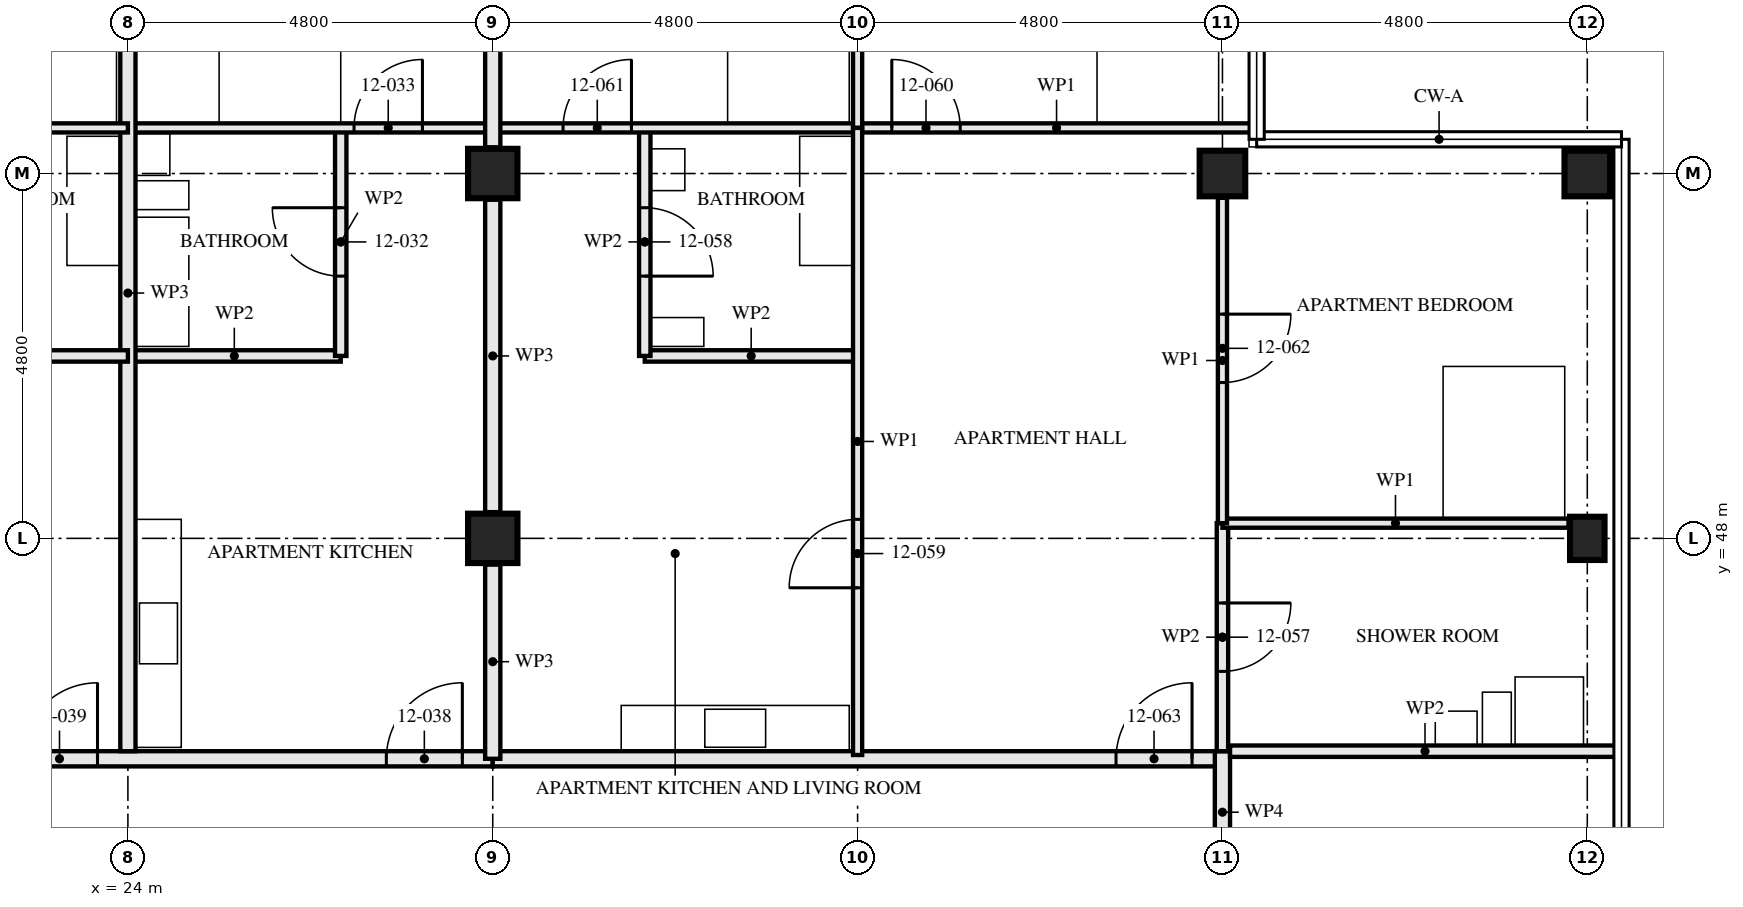
"""IFC4 building model, lengths in metres.
Left out: names, types, materials, properties, quantities, classifications, styles, units other than length and angle.
Written with IfcOpenShell. Run it as: python <this file> out.ifc"""

import sys

from ifc_helpers import new_model, si_unit, direction, frame, frame_2d, origin, origin_2d, place, context, subcontext, project, spatial, rectangle, hollow_rectangle, i_section, extrude, element, fill, save


model = new_model("IFC4")
c1 = context("Model", 3, precision=1e-05, world=origin(), true_north=direction((0.0, 1.0)))
c2 = subcontext(c1, "Body", "Model", "MODEL_VIEW")
j1 = project(units=[si_unit("LENGTHUNIT", "METRE"), si_unit("PLANEANGLEUNIT", "RADIAN")], contexts=[c1])
p1 = place(None, origin())
s1 = spatial("IfcSite", under=j1, at=p1, CompositionType="ELEMENT")
p2 = place(p1, origin())
s2 = spatial("IfcBuilding", under=s1, at=p2, CompositionType="ELEMENT")
p3 = place(p2, frame((0.0, 0.0, 48.0)))
s3 = spatial("IfcBuildingStorey", under=s2, at=p3, CompositionType="ELEMENT", Elevation=48.0)
for number, where, z_axis, x_axis in (
    (1, (28.8, 48.0, 0.0), (0.0, 0.0, 1.0), (1.0, 0.0, 0.0)),
    (2, (28.8, 52.8, 0.0), (0.0, 0.0, 1.0), (1.0, 0.0, 0.0)),
):
    element("IfcColumn", number, at=place(p3, frame(where, z_axis=z_axis, x_axis=x_axis)), inside=s3, PredefinedType="COLUMN", context=c2, shape_type="SweptSolid", body=[
        extrude(hollow_rectangle(XDim=0.65, YDim=0.65, WallThickness=0.05, at=origin_2d()), origin(), (0.0, 0.0, 1.0), 3.5),
    ])
p4 = place(p3, frame((38.4, 52.8, 0.0), z_axis=(0.0, 0.0, 1.0), x_axis=(0.0, 1.0, 0.0)))
e3 = element("IfcColumn", 3, at=p4, inside=s3, PredefinedType="COLUMN", context=c2, shape_type="SweptSolid", body=[
    extrude(hollow_rectangle(XDim=0.6, YDim=0.6, WallThickness=0.05, at=origin_2d()), origin(), (0.0, 0.0, 1.0), 3.5),
])
p5 = place(p3, frame((43.2, 48.0, 0.0), z_axis=(0.0, 0.0, 1.0), x_axis=(1.0, 0.0, 0.0)))
e4 = element("IfcColumn", 4, at=p5, inside=s3, PredefinedType="COLUMN", context=c2, shape_type="SweptSolid", body=[
    extrude(i_section(OverallWidth=0.454, OverallDepth=0.569, WebThickness=0.078, FlangeThickness=0.125, FilletRadius=0.015, at=origin_2d()), origin(), (0.0, 0.0, 1.0), 3.5),
])
p6 = place(p3, frame((43.2, 52.8, 0.0), z_axis=(0.0, 0.0, 1.0), x_axis=(0.0, 1.0, 0.0)))
e5 = element("IfcColumn", 5, at=p6, inside=s3, PredefinedType="COLUMN", context=c2, shape_type="SweptSolid", body=[
    extrude(hollow_rectangle(XDim=0.6, YDim=0.6, WallThickness=0.05, at=origin_2d()), origin(), (0.0, 0.0, 1.0), 3.5),
])
p7 = place(p3, frame((26.8, 53.4, 0.0), z_axis=(0.0, 0.0, 1.0), x_axis=(0.0, -1.0, 0.0)))
e6 = element("IfcWall", 6, at=p7, inside=s3, PredefinedType="PARTITIONING", context=c2, shape_type="SweptSolid", body=[
    extrude(rectangle(XDim=3.0, YDim=0.15, at=frame_2d((1.5, 0.0))), origin(), (0.0, 0.0, 1.0), 2.55),
])
p8 = place(p7, frame((1.05, 0.0, 0.0)))
e7 = element("IfcOpeningElement", 7, at=p8, cuts=e6, PredefinedType="OPENING", context=c2, shape_type="SweptSolid", body=[
    extrude(rectangle(XDim=0.9, YDim=2.1, at=frame_2d((0.45, 1.05))), frame((0.0, 0.085, 0.0), z_axis=(0.0, -1.0, 0.0), x_axis=(1.0, 0.0, 0.0)), (0.0, 0.0, 1.0), 0.171),
])
p9 = place(p3, frame((26.8, 50.4, 0.0), z_axis=(0.0, 0.0, 1.0), x_axis=(-1.0, 0.0, 0.0)))
e8 = element("IfcWall", 8, at=p9, inside=s3, PredefinedType="PARTITIONING", context=c2, shape_type="SweptSolid", body=[
    extrude(rectangle(XDim=2.8, YDim=0.15, at=frame_2d((1.4, 0.0))), origin(), (0.0, 0.0, 1.0), 3.33),
])
p10 = place(p3, frame((28.8, 53.4, 0.0), z_axis=(0.0, 0.0, 1.0), x_axis=(-1.0, 0.0, 0.0)))
e9 = element("IfcWall", 9, at=p10, inside=s3, PredefinedType="PARTITIONING", context=c2, shape_type="SweptSolid", body=[
    extrude(rectangle(XDim=4.8, YDim=0.12, at=frame_2d((2.4, 0.0))), origin(), (0.0, 0.0, 1.0), 3.33),
])
p11 = place(p10, frame((0.925, 0.0, 0.0)))
e10 = element("IfcOpeningElement", 10, at=p11, cuts=e9, PredefinedType="OPENING", context=c2, shape_type="SweptSolid", body=[
    extrude(rectangle(XDim=0.9, YDim=2.1, at=frame_2d((0.45, 1.05))), frame((0.0, 0.071, 0.0), z_axis=(0.0, -1.0, 0.0), x_axis=(1.0, 0.0, 0.0)), (0.0, 0.0, 1.0), 0.141),
])
p12 = place(p3, frame((24.0, 57.255, 0.0), z_axis=(0.0, 0.0, 1.0), x_axis=(0.0, -1.0, 0.0)))
e11 = element("IfcWall", 11, at=p12, inside=s3, PredefinedType="PARTITIONING", context=c2, shape_type="SweptSolid", body=[
    extrude(rectangle(XDim=12.055, YDim=0.2, at=frame_2d((6.027, 0.0))), origin(), (0.0, 0.0, 1.0), 2.55),
])
p13 = place(p3, frame((24.0, 50.4, 0.0), z_axis=(0.0, 0.0, 1.0), x_axis=(-1.0, 0.0, 0.0)))
e12 = element("IfcWall", 12, at=p13, inside=s3, PredefinedType="PARTITIONING", context=c2, shape_type="SweptSolid", body=[
    extrude(rectangle(XDim=2.8, YDim=0.15, at=frame_2d((1.4, 0.0))), origin(), (0.0, 0.0, 1.0), 3.33),
])
p14 = place(p3, frame((24.0, 53.4, 0.0), z_axis=(0.0, 0.0, 1.0), x_axis=(-1.0, 0.0, 0.0)))
e13 = element("IfcWall", 13, at=p14, inside=s3, PredefinedType="PARTITIONING", context=c2, shape_type="SweptSolid", body=[
    extrude(rectangle(XDim=4.8, YDim=0.12, at=frame_2d((2.4, 0.0))), origin(), (0.0, 0.0, 1.0), 3.33),
])
p15 = place(p14, frame((3.45, 0.0, 0.0)))
e14 = element("IfcOpeningElement", 14, at=p15, cuts=e13, PredefinedType="OPENING", context=c2, shape_type="SweptSolid", body=[
    extrude(rectangle(XDim=0.9, YDim=2.1, at=frame_2d((0.45, 1.05))), frame((0.0, 0.071, 0.0), z_axis=(0.0, -1.0, 0.0), x_axis=(1.0, 0.0, 0.0)), (0.0, 0.0, 1.0), 0.141),
])
p16 = place(p3, frame((28.8, 45.1, 0.0), z_axis=(0.0, 0.0, 1.0), x_axis=(-1.0, 0.0, 0.0)))
e15 = element("IfcWall", 15, at=p16, inside=s3, PredefinedType="PARTITIONING", context=c2, shape_type="SweptSolid", body=[
    extrude(rectangle(XDim=14.4, YDim=0.2, at=frame_2d((7.2, 0.0))), origin(), (0.0, 0.0, 1.0), 3.33),
])
p17 = place(p16, frame((0.4, 0.0, 0.0)))
e16 = element("IfcOpeningElement", 16, at=p17, cuts=e15, PredefinedType="OPENING", context=c2, shape_type="SweptSolid", body=[
    extrude(rectangle(XDim=1.0, YDim=2.1, at=frame_2d((0.5, 1.05))), frame((0.0, 0.111, 0.0), z_axis=(0.0, -1.0, 0.0), x_axis=(1.0, 0.0, 0.0)), (0.0, 0.0, 1.0), 0.221),
])
p18 = place(p16, frame((5.2, 0.0, 0.0)))
e17 = element("IfcOpeningElement", 17, at=p18, cuts=e15, PredefinedType="OPENING", context=c2, shape_type="SweptSolid", body=[
    extrude(rectangle(XDim=1.0, YDim=2.1, at=frame_2d((0.5, 1.05))), frame((0.0, 0.111, 0.0), z_axis=(0.0, -1.0, 0.0), x_axis=(1.0, 0.0, 0.0)), (0.0, 0.0, 1.0), 0.221),
])
p19 = place(p16, frame((10.0, 0.0, 0.0)))
e18 = element("IfcOpeningElement", 18, at=p19, cuts=e15, PredefinedType="OPENING", context=c2, shape_type="SweptSolid", body=[
    extrude(rectangle(XDim=1.0, YDim=2.1, at=frame_2d((0.5, 1.05))), frame((0.0, 0.111, 0.0), z_axis=(0.0, -1.0, 0.0), x_axis=(1.0, 0.0, 0.0)), (0.0, 0.0, 1.0), 0.221),
])
p20 = place(p3, frame((38.4, 48.2, 0.0), z_axis=(0.0, 0.0, 1.0), x_axis=(0.0, -1.0, 0.0)))
e19 = element("IfcWall", 19, at=p20, inside=s3, PredefinedType="PARTITIONING", context=c2, shape_type="SweptSolid", body=[
    extrude(rectangle(XDim=3.0, YDim=0.15, at=frame_2d((1.5, 0.0))), origin(), (0.0, 0.0, 1.0), 2.55),
])
p21 = place(p20, frame((1.05, 0.0, 0.0)))
e20 = element("IfcOpeningElement", 20, at=p21, cuts=e19, PredefinedType="OPENING", context=c2, shape_type="SweptSolid", body=[
    extrude(rectangle(XDim=0.9, YDim=2.1, at=frame_2d((0.45, 1.05))), frame((0.0, 0.085, 0.0), z_axis=(0.0, -1.0, 0.0), x_axis=(1.0, 0.0, 0.0)), (0.0, 0.0, 1.0), 0.171),
])
p22 = place(p3, frame((30.8, 53.4, 0.0), z_axis=(0.0, 0.0, 1.0), x_axis=(0.0, -1.0, 0.0)))
e21 = element("IfcWall", 21, at=p22, inside=s3, PredefinedType="PARTITIONING", context=c2, shape_type="SweptSolid", body=[
    extrude(rectangle(XDim=3.0, YDim=0.15, at=frame_2d((1.5, 0.0))), origin(), (0.0, 0.0, 1.0), 2.55),
])
p23 = place(p22, frame((1.05, 0.0, 0.0)))
e22 = element("IfcOpeningElement", 22, at=p23, cuts=e21, PredefinedType="OPENING", context=c2, shape_type="SweptSolid", body=[
    extrude(rectangle(XDim=0.9, YDim=2.1, at=frame_2d((0.45, 1.05))), frame((0.0, 0.085, 0.0), z_axis=(0.0, -1.0, 0.0), x_axis=(1.0, 0.0, 0.0)), (0.0, 0.0, 1.0), 0.171),
])
p24 = place(p3, frame((33.6, 50.4, 0.0), z_axis=(0.0, 0.0, 1.0), x_axis=(-1.0, 0.0, 0.0)))
e23 = element("IfcWall", 23, at=p24, inside=s3, PredefinedType="PARTITIONING", context=c2, shape_type="SweptSolid", body=[
    extrude(rectangle(XDim=2.8, YDim=0.15, at=frame_2d((1.4, 0.0))), origin(), (0.0, 0.0, 1.0), 3.33),
])
p25 = place(p3, frame((33.6, 53.4, 0.0), z_axis=(0.0, 0.0, 1.0), x_axis=(0.0, -1.0, 0.0)))
e24 = element("IfcWall", 24, at=p25, inside=s3, PredefinedType="PARTITIONING", context=c2, shape_type="SweptSolid", body=[
    extrude(rectangle(XDim=8.25, YDim=0.12, at=frame_2d((4.125, 0.0))), origin(), (0.0, 0.0, 1.0), 2.55),
])
p26 = place(p25, frame((5.15, 0.0, 0.0)))
e25 = element("IfcOpeningElement", 25, at=p26, cuts=e24, PredefinedType="OPENING", context=c2, shape_type="SweptSolid", body=[
    extrude(rectangle(XDim=0.9, YDim=2.1, at=frame_2d((0.45, 1.05))), frame((0.0, 0.071, 0.0), z_axis=(0.0, -1.0, 0.0), x_axis=(1.0, 0.0, 0.0)), (0.0, 0.0, 1.0), 0.141),
])
p27 = place(p3, frame((42.953, 48.2, 0.0), z_axis=(0.0, 0.0, 1.0), x_axis=(-1.0, 0.0, 0.0)))
e26 = element("IfcWall", 26, at=p27, inside=s3, PredefinedType="PARTITIONING", context=c2, shape_type="SweptSolid", body=[
    extrude(rectangle(XDim=4.553, YDim=0.12, at=frame_2d((2.276, 0.0))), origin(), (0.0, 0.0, 1.0), 3.33),
])
p28 = place(p3, frame((38.835, 53.4, 0.0), z_axis=(0.0, 0.0, 1.0), x_axis=(-1.0, 0.0, 0.0)))
e27 = element("IfcWall", 27, at=p28, inside=s3, PredefinedType="PARTITIONING", context=c2, shape_type="SweptSolid", body=[
    extrude(rectangle(XDim=5.235, YDim=0.12, at=frame_2d((2.617, 0.0))), origin(), (0.0, 0.0, 1.0), 2.32),
])
p29 = place(p28, frame((3.885, 0.0, 0.0)))
e28 = element("IfcOpeningElement", 28, at=p29, cuts=e27, PredefinedType="OPENING", context=c2, shape_type="SweptSolid", body=[
    extrude(rectangle(XDim=0.9, YDim=2.1, at=frame_2d((0.45, 1.05))), frame((0.0, 0.071, 0.0), z_axis=(0.0, -1.0, 0.0), x_axis=(1.0, 0.0, 0.0)), (0.0, 0.0, 1.0), 0.141),
])
p30 = place(p3, frame((33.6, 53.4, 0.0), z_axis=(0.0, 0.0, 1.0), x_axis=(-1.0, 0.0, 0.0)))
e29 = element("IfcWall", 29, at=p30, inside=s3, PredefinedType="PARTITIONING", context=c2, shape_type="SweptSolid", body=[
    extrude(rectangle(XDim=4.8, YDim=0.12, at=frame_2d((2.4, 0.0))), origin(), (0.0, 0.0, 1.0), 3.33),
])
p31 = place(p30, frame((2.975, 0.0, 0.0)))
e30 = element("IfcOpeningElement", 30, at=p31, cuts=e29, PredefinedType="OPENING", context=c2, shape_type="SweptSolid", body=[
    extrude(rectangle(XDim=0.9, YDim=2.1, at=frame_2d((0.45, 1.05))), frame((0.0, 0.071, 0.0), z_axis=(0.0, -1.0, 0.0), x_axis=(1.0, 0.0, 0.0)), (0.0, 0.0, 1.0), 0.141),
])
p32 = place(p3, frame((38.4, 52.48, 0.0), z_axis=(0.0, 0.0, 1.0), x_axis=(0.0, -1.0, 0.0)))
e31 = element("IfcWall", 31, at=p32, inside=s3, PredefinedType="PARTITIONING", context=c2, shape_type="SweptSolid", body=[
    extrude(rectangle(XDim=4.28, YDim=0.12, at=frame_2d((2.14, 0.0))), origin(), (0.0, 0.0, 1.0), 3.33),
])
p33 = place(p32, frame((1.53, 0.0, 0.0)))
e32 = element("IfcOpeningElement", 32, at=p33, cuts=e31, PredefinedType="OPENING", context=c2, shape_type="SweptSolid", body=[
    extrude(rectangle(XDim=0.9, YDim=2.1, at=frame_2d((0.45, 1.05))), frame((0.0, 0.071, 0.0), z_axis=(0.0, -1.0, 0.0), x_axis=(1.0, 0.0, 0.0)), (0.0, 0.0, 1.0), 0.141),
])
p34 = place(p3, frame((33.6, 57.353, 0.0), z_axis=(0.0, 0.0, 1.0), x_axis=(0.0, -1.0, 0.0)))
e33 = element("IfcWall", 33, at=p34, inside=s3, PredefinedType="PARTITIONING", context=c2, shape_type="SweptSolid", body=[
    extrude(rectangle(XDim=3.953, YDim=0.12, at=frame_2d((1.977, 0.0))), origin(), (0.0, 0.0, 1.0), 3.33),
])
p35 = place(p3, frame((38.4, 45.1, 0.0), z_axis=(0.0, 0.0, 1.0), x_axis=(-1.0, 0.0, 0.0)))
e34 = element("IfcWall", 34, at=p35, inside=s3, PredefinedType="PARTITIONING", context=c2, shape_type="SweptSolid", body=[
    extrude(rectangle(XDim=9.6, YDim=0.2, at=frame_2d((4.8, 0.0))), origin(), (0.0, 0.0, 1.0), 3.33),
])
p36 = place(p35, frame((0.4, 0.0, 0.0)))
e35 = element("IfcOpeningElement", 35, at=p36, cuts=e34, PredefinedType="OPENING", context=c2, shape_type="SweptSolid", body=[
    extrude(rectangle(XDim=1.0, YDim=2.1, at=frame_2d((0.5, 1.05))), frame((0.0, 0.111, 0.0), z_axis=(0.0, -1.0, 0.0), x_axis=(1.0, 0.0, 0.0)), (0.0, 0.0, 1.0), 0.221),
])
p37 = place(p3, frame((38.4, 45.2, 0.0), z_axis=(0.0, 0.0, 1.0), x_axis=(0.0, -1.0, 0.0)))
e36 = element("IfcWall", 36, at=p37, inside=s3, PredefinedType="PARTITIONING", context=c2, shape_type="SweptSolid", body=[
    extrude(rectangle(XDim=1.605, YDim=0.2, at=frame_2d((0.802, 0.0))), origin(), (0.0, 0.0, 1.0), 3.33),
])
p38 = place(p3, frame((28.8, 45.1, 0.0), z_axis=(0.0, 0.0, 1.0), x_axis=(0.0, 1.0, 0.0)))
e37 = element("IfcWall", 37, at=p38, inside=s3, PredefinedType="PARTITIONING", context=c2, shape_type="SweptSolid", body=[
    extrude(rectangle(XDim=2.555, YDim=0.2, at=frame_2d((1.277, 0.0))), origin(), (0.0, 0.0, 1.0), 2.32),
])
p39 = place(p3, frame((28.8, 48.345, 0.0), z_axis=(0.0, 0.0, 1.0), x_axis=(0.0, 1.0, 0.0)))
e38 = element("IfcWall", 38, at=p39, inside=s3, PredefinedType="PARTITIONING", context=c2, shape_type="SweptSolid", body=[
    extrude(rectangle(XDim=4.11, YDim=0.2, at=frame_2d((2.055, 0.0))), origin(), (0.0, 0.0, 1.0), 2.32),
])
p40 = place(p3, frame((28.8, 53.145, 0.0), z_axis=(0.0, 0.0, 1.0), x_axis=(0.0, 1.0, 0.0)))
e39 = element("IfcWall", 39, at=p40, inside=s3, PredefinedType="PARTITIONING", context=c2, shape_type="SweptSolid", body=[
    extrude(rectangle(XDim=4.208, YDim=0.2, at=frame_2d((2.104, 0.0))), origin(), (0.0, 0.0, 1.0), 2.32),
])
p41 = place(p3, frame((43.63, 45.2, 0.0), z_axis=(0.0, 0.0, 1.0), x_axis=(-1.0, 0.0, 0.0)))
e40 = element("IfcWall", 40, at=p41, inside=s3, PredefinedType="PARTITIONING", context=c2, shape_type="SweptSolid", body=[
    extrude(rectangle(XDim=5.13, YDim=0.15, at=frame_2d((2.565, 0.0))), origin(), (0.0, 0.0, 1.0), 2.32),
])
p42 = place(p8, frame((0.9, 0.0, 0.0), z_axis=(0.0, 0.0, 1.0), x_axis=(-1.0, 0.0, 0.0)))
e41 = element("IfcDoor", 41, at=p42, inside=s3, OperationType="SINGLE_SWING_LEFT", PredefinedType="DOOR", context=c2, shape_type="SweptSolid", body=[
    extrude(rectangle(XDim=0.9, YDim=2.1, at=frame_2d((0.45, 1.05))), frame((0.0, 0.022, 0.0), z_axis=(0.0, -1.0, 0.0), x_axis=(1.0, 0.0, 0.0)), (0.0, 0.0, 1.0), 0.044),
])
fill(e7, e41)
p43 = place(p11, frame((0.9, 0.0, 0.0), z_axis=(0.0, 0.0, 1.0), x_axis=(-1.0, 0.0, 0.0)))
e42 = element("IfcDoor", 42, at=p43, inside=s3, OperationType="SINGLE_SWING_LEFT", PredefinedType="DOOR", context=c2, shape_type="SweptSolid", body=[
    extrude(rectangle(XDim=0.9, YDim=2.1, at=frame_2d((0.45, 1.05))), frame((0.0, 0.022, 0.0), z_axis=(0.0, -1.0, 0.0), x_axis=(1.0, 0.0, 0.0)), (0.0, 0.0, 1.0), 0.044),
])
fill(e10, e42)
p44 = place(p17, frame((1.0, 0.0, 0.0), z_axis=(0.0, 0.0, 1.0), x_axis=(-1.0, 0.0, 0.0)))
e43 = element("IfcDoor", 43, at=p44, inside=s3, OperationType="SINGLE_SWING_LEFT", PredefinedType="DOOR", context=c2, shape_type="SweptSolid", body=[
    extrude(rectangle(XDim=1.0, YDim=2.1, at=frame_2d((0.5, 1.05))), frame((0.0, 0.027, 0.0), z_axis=(0.0, -1.0, 0.0), x_axis=(1.0, 0.0, 0.0)), (0.0, 0.0, 1.0), 0.054),
])
fill(e16, e43)
p45 = place(p18, frame((1.0, 0.0, 0.0), z_axis=(0.0, 0.0, 1.0), x_axis=(-1.0, 0.0, 0.0)))
e44 = element("IfcDoor", 44, at=p45, inside=s3, OperationType="SINGLE_SWING_LEFT", PredefinedType="DOOR", context=c2, shape_type="SweptSolid", body=[
    extrude(rectangle(XDim=1.0, YDim=2.1, at=frame_2d((0.5, 1.05))), frame((0.0, 0.027, 0.0), z_axis=(0.0, -1.0, 0.0), x_axis=(1.0, 0.0, 0.0)), (0.0, 0.0, 1.0), 0.054),
])
fill(e17, e44)
p46 = place(p21, origin())
e45 = element("IfcDoor", 45, at=p46, inside=s3, OperationType="SINGLE_SWING_RIGHT", PredefinedType="DOOR", context=c2, shape_type="SweptSolid", body=[
    extrude(rectangle(XDim=0.9, YDim=2.1, at=frame_2d((0.45, 1.05))), frame((0.0, 0.022, 0.0), z_axis=(0.0, -1.0, 0.0), x_axis=(1.0, 0.0, 0.0)), (0.0, 0.0, 1.0), 0.044),
])
fill(e20, e45)
p47 = place(p23, origin())
e46 = element("IfcDoor", 46, at=p47, inside=s3, OperationType="SINGLE_SWING_LEFT", PredefinedType="DOOR", context=c2, shape_type="SweptSolid", body=[
    extrude(rectangle(XDim=0.9, YDim=2.1, at=frame_2d((0.45, 1.05))), frame((0.0, 0.022, 0.0), z_axis=(0.0, -1.0, 0.0), x_axis=(1.0, 0.0, 0.0)), (0.0, 0.0, 1.0), 0.044),
])
fill(e22, e46)
p48 = place(p26, frame((0.9, 0.0, 0.0), z_axis=(0.0, 0.0, 1.0), x_axis=(-1.0, 0.0, 0.0)))
e47 = element("IfcDoor", 47, at=p48, inside=s3, OperationType="SINGLE_SWING_RIGHT", PredefinedType="DOOR", context=c2, shape_type="SweptSolid", body=[
    extrude(rectangle(XDim=0.9, YDim=2.1, at=frame_2d((0.45, 1.05))), frame((0.0, 0.022, 0.0), z_axis=(0.0, -1.0, 0.0), x_axis=(1.0, 0.0, 0.0)), (0.0, 0.0, 1.0), 0.044),
])
fill(e25, e47)
p49 = place(p29, frame((0.9, 0.0, 0.0), z_axis=(0.0, 0.0, 1.0), x_axis=(-1.0, 0.0, 0.0)))
e48 = element("IfcDoor", 48, at=p49, inside=s3, OperationType="SINGLE_SWING_RIGHT", PredefinedType="DOOR", context=c2, shape_type="SweptSolid", body=[
    extrude(rectangle(XDim=0.9, YDim=2.1, at=frame_2d((0.45, 1.05))), frame((0.0, 0.022, 0.0), z_axis=(0.0, -1.0, 0.0), x_axis=(1.0, 0.0, 0.0)), (0.0, 0.0, 1.0), 0.044),
])
fill(e28, e48)
p50 = place(p31, frame((0.9, 0.0, 0.0), z_axis=(0.0, 0.0, 1.0), x_axis=(-1.0, 0.0, 0.0)))
e49 = element("IfcDoor", 49, at=p50, inside=s3, OperationType="SINGLE_SWING_LEFT", PredefinedType="DOOR", context=c2, shape_type="SweptSolid", body=[
    extrude(rectangle(XDim=0.9, YDim=2.1, at=frame_2d((0.45, 1.05))), frame((0.0, 0.022, 0.0), z_axis=(0.0, -1.0, 0.0), x_axis=(1.0, 0.0, 0.0)), (0.0, 0.0, 1.0), 0.044),
])
fill(e30, e49)
p51 = place(p33, origin())
e50 = element("IfcDoor", 50, at=p51, inside=s3, OperationType="SINGLE_SWING_RIGHT", PredefinedType="DOOR", context=c2, shape_type="SweptSolid", body=[
    extrude(rectangle(XDim=0.9, YDim=2.1, at=frame_2d((0.45, 1.05))), frame((0.0, 0.022, 0.0), z_axis=(0.0, -1.0, 0.0), x_axis=(1.0, 0.0, 0.0)), (0.0, 0.0, 1.0), 0.044),
])
fill(e32, e50)
p52 = place(p36, frame((1.0, 0.0, 0.0), z_axis=(0.0, 0.0, 1.0), x_axis=(-1.0, 0.0, 0.0)))
e51 = element("IfcDoor", 51, at=p52, inside=s3, OperationType="SINGLE_SWING_LEFT", PredefinedType="DOOR", context=c2, shape_type="SweptSolid", body=[
    extrude(rectangle(XDim=1.0, YDim=2.1, at=frame_2d((0.5, 1.05))), frame((0.0, 0.027, 0.0), z_axis=(0.0, -1.0, 0.0), x_axis=(1.0, 0.0, 0.0)), (0.0, 0.0, 1.0), 0.054),
])
fill(e35, e51)
save(model, sys.argv[1])
